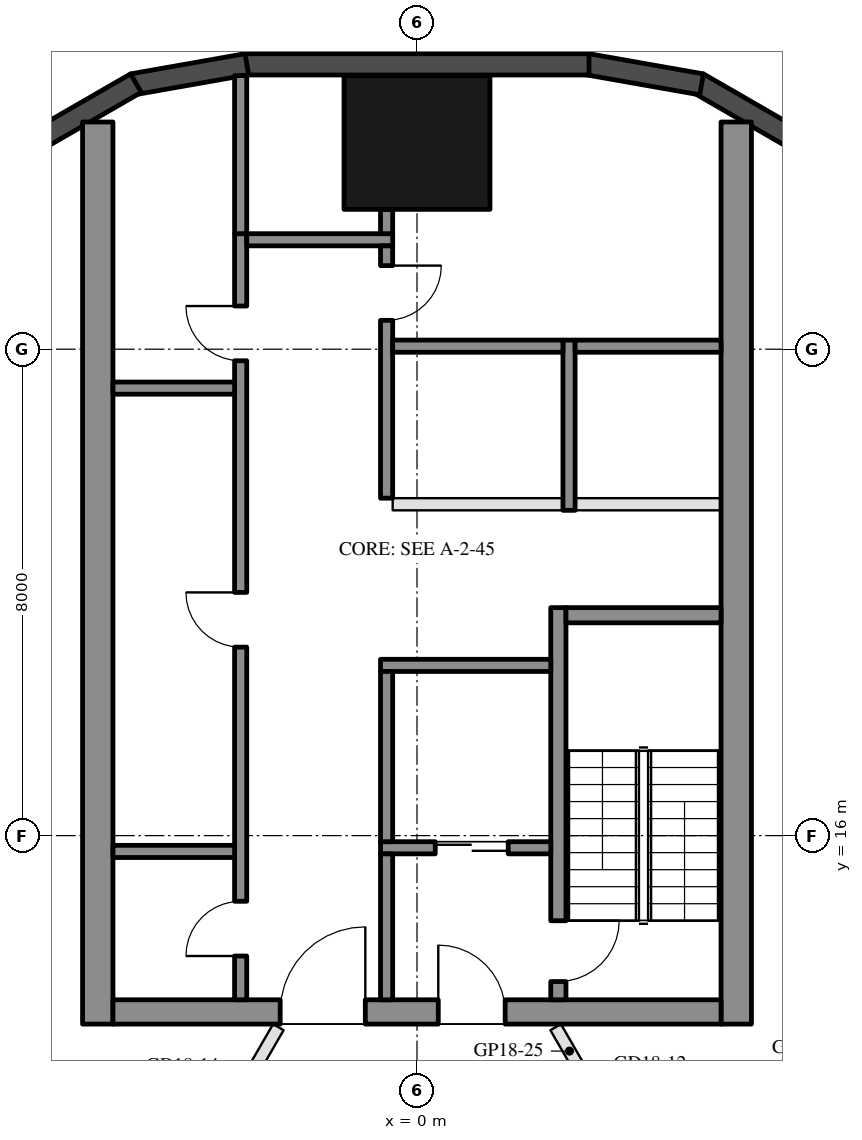
"""IFC4 building model, lengths in metres.
Left out: names, types, materials, properties, quantities, classifications, styles, units other than length and angle.
Written with IfcOpenShell. Run it as: python <this file> out.ifc"""

import sys

from ifc_helpers import new_model, si_unit, direction, frame, frame_2d, origin, origin_2d, place, context, subcontext, project, spatial, rectangle, hollow_rectangle, extrude, element, fill, save


model = new_model("IFC4")
c1 = context("Model", 3, precision=1e-05, world=origin(), true_north=direction((0.0, 1.0)))
c2 = subcontext(c1, "Body", "Model", "MODEL_VIEW")
j1 = project(units=[si_unit("LENGTHUNIT", "METRE"), si_unit("PLANEANGLEUNIT", "RADIAN")], contexts=[c1])
p1 = place(None, origin())
s1 = spatial("IfcSite", under=j1, at=p1, CompositionType="ELEMENT")
p2 = place(p1, origin())
s2 = spatial("IfcBuilding", under=s1, at=p2, CompositionType="ELEMENT")
p3 = place(p2, frame((0.0, 0.0, 191.0)))
s3 = spatial("IfcBuildingStorey", under=s2, at=p3, CompositionType="ELEMENT", Elevation=191.0)
p4 = place(p3, frame((0.0, 27.4, 0.0), z_axis=(0.0, 0.0, 1.0), x_axis=(1.0, 0.0, 0.0)))
e1 = element("IfcColumn", 1, at=p4, inside=s3, PredefinedType="COLUMN", context=c2, shape_type="SweptSolid", body=[
    extrude(hollow_rectangle(XDim=2.4, YDim=2.2, WallThickness=0.06, at=origin_2d()), origin(), (0.0, 0.0, 1.0), 3.7),
])
for number, where, z_axis, x_axis in (
    (2, (6.277, 27.422, 0.0), (0.0, 0.0, 1.0), (-0.866, 0.5, 0.0)),
    (3, (4.68, 28.356, 0.0), (0.0, 0.0, 1.0), (-0.985, 0.174, 0.0)),
):
    element("IfcWall", number, at=place(p3, frame(where, z_axis=z_axis, x_axis=x_axis)), inside=s3, PredefinedType="SOLIDWALL", context=c2, shape_type="SweptSolid", body=[
        extrude(rectangle(XDim=1.91, YDim=0.35, at=frame_2d((0.955, 0.0))), origin(), (0.0, 0.0, 1.0), 3.55),
    ])
p5 = place(p3, frame((2.829, 28.685, 0.0), z_axis=(0.0, 0.0, 1.0), x_axis=(-1.0, 0.0, 0.0)))
e4 = element("IfcWall", 4, at=p5, inside=s3, PredefinedType="SOLIDWALL", context=c2, shape_type="SweptSolid", body=[
    extrude(rectangle(XDim=5.658, YDim=0.35, at=frame_2d((2.829, 0.0))), origin(), (0.0, 0.0, 1.0), 3.55),
])
for number, where, z_axis, x_axis in (
    (5, (-2.799, 28.688, 0.0), (0.0, 0.0, 1.0), (-0.985, -0.174, 0.0)),
    (6, (-4.623, 28.377, 0.0), (0.0, 0.0, 1.0), (-0.866, -0.5, 0.0)),
):
    element("IfcWall", number, at=place(p3, frame(where, z_axis=z_axis, x_axis=x_axis)), inside=s3, PredefinedType="SOLIDWALL", context=c2, shape_type="SweptSolid", body=[
        extrude(rectangle(XDim=1.91, YDim=0.35, at=frame_2d((0.955, 0.0))), origin(), (0.0, 0.0, 1.0), 3.55),
    ])
for number, where, z_axis, x_axis in (
    (7, (5.25, 12.9, 0.0), (0.0, 0.0, 1.0), (0.0, 1.0, 0.0)),
    (8, (-5.25, 12.9, 0.0), (0.0, 0.0, 1.0), (0.0, 1.0, 0.0)),
):
    element("IfcWall", number, at=place(p3, frame(where, z_axis=z_axis, x_axis=x_axis)), inside=s3, PredefinedType="SHEAR", context=c2, shape_type="SweptSolid", body=[
        extrude(rectangle(XDim=14.837, YDim=0.5, at=frame_2d((7.418, 0.0))), origin(), (0.0, 0.0, 1.0), 3.5),
    ])
p6 = place(p3, frame((5.0, 13.1, 0.0), z_axis=(0.0, 0.0, 1.0), x_axis=(-1.0, 0.0, 0.0)))
e9 = element("IfcWall", 9, at=p6, inside=s3, PredefinedType="SHEAR", context=c2, shape_type="SweptSolid", body=[
    extrude(rectangle(XDim=10.0, YDim=0.4, at=frame_2d((5.0, 0.0))), origin(), (0.0, 0.0, 1.0), 3.5),
])
p7 = place(p6, frame((3.55, 0.0, 0.0)))
e10 = element("IfcOpeningElement", 10, at=p7, cuts=e9, PredefinedType="OPENING", context=c2, shape_type="SweptSolid", body=[
    extrude(rectangle(XDim=1.1, YDim=2.1, at=frame_2d((0.55, 1.05))), frame((0.0, 0.21, 0.0), z_axis=(0.0, -1.0, 0.0), x_axis=(1.0, 0.0, 0.0)), (0.0, 0.0, 1.0), 0.42),
])
p8 = place(p6, frame((5.85, 0.0, 0.0)))
e11 = element("IfcOpeningElement", 11, at=p8, cuts=e9, PredefinedType="OPENING", context=c2, shape_type="SweptSolid", body=[
    extrude(rectangle(XDim=1.4, YDim=2.1, at=frame_2d((0.7, 1.05))), frame((0.0, 0.21, 0.0), z_axis=(0.0, -1.0, 0.0), x_axis=(1.0, 0.0, 0.0)), (0.0, 0.0, 1.0), 0.42),
])
p9 = place(p3, frame((2.325, 13.3, 0.0), z_axis=(0.0, 0.0, 1.0), x_axis=(0.0, 1.0, 0.0)))
e12 = element("IfcWall", 12, at=p9, inside=s3, PredefinedType="SHEAR", context=c2, shape_type="SweptSolid", body=[
    extrude(rectangle(XDim=6.45, YDim=0.25, at=frame_2d((3.225, 0.0))), origin(), (0.0, 0.0, 1.0), 3.5),
])
p10 = place(p9, frame((0.3, 0.0, 0.0)))
e13 = element("IfcOpeningElement", 13, at=p10, cuts=e12, PredefinedType="OPENING", context=c2, shape_type="SweptSolid", body=[
    extrude(rectangle(XDim=1.0, YDim=2.1, at=frame_2d((0.5, 1.05))), frame((0.0, 0.135, 0.0), z_axis=(0.0, -1.0, 0.0), x_axis=(1.0, 0.0, 0.0)), (0.0, 0.0, 1.0), 0.27),
])
p11 = place(p3, frame((5.0, 19.625, 0.0), z_axis=(0.0, 0.0, 1.0), x_axis=(-1.0, 0.0, 0.0)))
e14 = element("IfcWall", 14, at=p11, inside=s3, PredefinedType="SHEAR", context=c2, shape_type="SweptSolid", body=[
    extrude(rectangle(XDim=2.55, YDim=0.25, at=frame_2d((1.275, 0.0))), origin(), (0.0, 0.0, 1.0), 3.5),
])
p12 = place(p3, frame((2.2, 18.8, 0.0), z_axis=(0.0, 0.0, 1.0), x_axis=(-1.0, 0.0, 0.0)))
e15 = element("IfcWall", 15, at=p12, inside=s3, PredefinedType="SHEAR", context=c2, shape_type="SweptSolid", body=[
    extrude(rectangle(XDim=2.8, YDim=0.2, at=frame_2d((1.4, 0.0))), origin(), (0.0, 0.0, 1.0), 3.5),
])
p13 = place(p3, frame((2.2, 15.8, 0.0), z_axis=(0.0, 0.0, 1.0), x_axis=(-1.0, 0.0, 0.0)))
e16 = element("IfcWall", 16, at=p13, inside=s3, PredefinedType="SHEAR", context=c2, shape_type="SweptSolid", body=[
    extrude(rectangle(XDim=2.8, YDim=0.2, at=frame_2d((1.4, 0.0))), origin(), (0.0, 0.0, 1.0), 3.5),
])
p14 = place(p13, frame((0.7, 0.0, 0.0)))
e17 = element("IfcOpeningElement", 17, at=p14, cuts=e16, PredefinedType="OPENING", context=c2, shape_type="SweptSolid", body=[
    extrude(rectangle(XDim=1.2, YDim=2.1, at=frame_2d((0.6, 1.05))), frame((0.0, 0.11, 0.0), z_axis=(0.0, -1.0, 0.0), x_axis=(1.0, 0.0, 0.0)), (0.0, 0.0, 1.0), 0.22),
])
p15 = place(p3, frame((-0.5, 15.9, 0.0), z_axis=(0.0, 0.0, 1.0), x_axis=(0.0, 1.0, 0.0)))
e18 = element("IfcWall", 18, at=p15, inside=s3, PredefinedType="SHEAR", context=c2, shape_type="SweptSolid", body=[
    extrude(rectangle(XDim=2.8, YDim=0.2, at=frame_2d((1.4, 0.0))), origin(), (0.0, 0.0, 1.0), 3.5),
])
p16 = place(p3, frame((-0.5, 13.3, 0.0), z_axis=(0.0, 0.0, 1.0), x_axis=(0.0, 1.0, 0.0)))
e19 = element("IfcWall", 19, at=p16, inside=s3, PredefinedType="SHEAR", context=c2, shape_type="SweptSolid", body=[
    extrude(rectangle(XDim=2.4, YDim=0.2, at=frame_2d((1.2, 0.0))), origin(), (0.0, 0.0, 1.0), 3.5),
])
p17 = place(p3, frame((-2.9, 13.3, 0.0), z_axis=(0.0, 0.0, 1.0), x_axis=(0.0, 1.0, 0.0)))
e20 = element("IfcWall", 20, at=p17, inside=s3, PredefinedType="SHEAR", context=c2, shape_type="SweptSolid", body=[
    extrude(rectangle(XDim=12.6, YDim=0.2, at=frame_2d((6.3, 0.0))), origin(), (0.0, 0.0, 1.0), 3.5),
])
p18 = place(p17, frame((0.72, 0.0, 0.0)))
e21 = element("IfcOpeningElement", 21, at=p18, cuts=e20, PredefinedType="OPENING", context=c2, shape_type="SweptSolid", body=[
    extrude(rectangle(XDim=0.9, YDim=2.1, at=frame_2d((0.45, 1.05))), frame((0.0, 0.11, 0.0), z_axis=(0.0, -1.0, 0.0), x_axis=(1.0, 0.0, 0.0)), (0.0, 0.0, 1.0), 0.22),
])
p19 = place(p17, frame((5.8, 0.0, 0.0)))
e22 = element("IfcOpeningElement", 22, at=p19, cuts=e20, PredefinedType="OPENING", context=c2, shape_type="SweptSolid", body=[
    extrude(rectangle(XDim=0.9, YDim=2.1, at=frame_2d((0.45, 1.05))), frame((0.0, 0.11, 0.0), z_axis=(0.0, -1.0, 0.0), x_axis=(1.0, 0.0, 0.0)), (0.0, 0.0, 1.0), 0.22),
])
p20 = place(p17, frame((10.51, 0.0, 0.0)))
e23 = element("IfcOpeningElement", 23, at=p20, cuts=e20, PredefinedType="OPENING", context=c2, shape_type="SweptSolid", body=[
    extrude(rectangle(XDim=0.9, YDim=2.1, at=frame_2d((0.45, 1.05))), frame((0.0, 0.11, 0.0), z_axis=(0.0, -1.0, 0.0), x_axis=(1.0, 0.0, 0.0)), (0.0, 0.0, 1.0), 0.22),
])
p21 = place(p3, frame((-0.4, 25.8, 0.0), z_axis=(0.0, 0.0, 1.0), x_axis=(-1.0, 0.0, 0.0)))
e24 = element("IfcWall", 24, at=p21, inside=s3, PredefinedType="SHEAR", context=c2, shape_type="SweptSolid", body=[
    extrude(rectangle(XDim=2.4, YDim=0.2, at=frame_2d((1.2, 0.0))), origin(), (0.0, 0.0, 1.0), 3.5),
])
p22 = place(p3, frame((-0.5, 21.55, 0.0), z_axis=(0.0, 0.0, 1.0), x_axis=(0.0, 1.0, 0.0)))
e25 = element("IfcWall", 25, at=p22, inside=s3, PredefinedType="SHEAR", context=c2, shape_type="SweptSolid", body=[
    extrude(rectangle(XDim=4.15, YDim=0.2, at=frame_2d((2.075, 0.0))), origin(), (0.0, 0.0, 1.0), 3.5),
])
p23 = place(p22, frame((2.925, 0.0, 0.0)))
e26 = element("IfcOpeningElement", 26, at=p23, cuts=e25, PredefinedType="OPENING", context=c2, shape_type="SweptSolid", body=[
    extrude(rectangle(XDim=0.9, YDim=2.1, at=frame_2d((0.45, 1.05))), frame((0.0, 0.11, 0.0), z_axis=(0.0, -1.0, 0.0), x_axis=(1.0, 0.0, 0.0)), (0.0, 0.0, 1.0), 0.22),
])
for number, where, z_axis, x_axis in (
    (27, (-3.0, 15.74, 0.0), (0.0, 0.0, 1.0), (-1.0, 0.0, 0.0)),
    (28, (-3.0, 23.36, 0.0), (0.0, 0.0, 1.0), (-1.0, 0.0, 0.0)),
):
    element("IfcWall", number, at=place(p3, frame(where, z_axis=z_axis, x_axis=x_axis)), inside=s3, PredefinedType="SHEAR", context=c2, shape_type="SweptSolid", body=[
        extrude(rectangle(XDim=2.0, YDim=0.2, at=frame_2d((1.0, 0.0))), origin(), (0.0, 0.0, 1.0), 3.5),
    ])
p24 = place(p3, frame((-0.5, 25.9, 0.0), z_axis=(0.0, 0.0, 1.0), x_axis=(0.0, 1.0, 0.0)))
e29 = element("IfcWall", 29, at=p24, inside=s3, PredefinedType="SHEAR", context=c2, shape_type="SweptSolid", body=[
    extrude(rectangle(XDim=0.4, YDim=0.2, at=frame_2d((0.2, 0.0))), origin(), (0.0, 0.0, 1.0), 3.5),
])
p25 = place(p3, frame((-2.9, 25.9, 0.0), z_axis=(0.0, 0.0, 1.0), x_axis=(0.0, 1.0, 0.0)))
e30 = element("IfcWall", 30, at=p25, inside=s3, PredefinedType="SHEAR", context=c2, shape_type="SweptSolid", body=[
    extrude(rectangle(XDim=2.6, YDim=0.2, at=frame_2d((1.3, 0.0))), origin(), (0.0, 0.0, 1.0), 3.5),
])
p26 = place(p3, frame((2.5, 21.35, 0.0), z_axis=(0.0, 0.0, 1.0), x_axis=(0.0, 1.0, 0.0)))
e31 = element("IfcWall", 31, at=p26, inside=s3, PredefinedType="SHEAR", context=c2, shape_type="SweptSolid", body=[
    extrude(rectangle(XDim=2.8, YDim=0.2, at=frame_2d((1.4, 0.0))), origin(), (0.0, 0.0, 1.0), 3.5),
])
p27 = place(p3, frame((5.0, 24.05, 0.0), z_axis=(0.0, 0.0, 1.0), x_axis=(-1.0, 0.0, 0.0)))
e32 = element("IfcWall", 32, at=p27, inside=s3, PredefinedType="SHEAR", context=c2, shape_type="SweptSolid", body=[
    extrude(rectangle(XDim=2.4, YDim=0.2, at=frame_2d((1.2, 0.0))), origin(), (0.0, 0.0, 1.0), 3.5),
])
p28 = place(p3, frame((2.4, 24.05, 0.0), z_axis=(0.0, 0.0, 1.0), x_axis=(-1.0, 0.0, 0.0)))
e33 = element("IfcWall", 33, at=p28, inside=s3, PredefinedType="SHEAR", context=c2, shape_type="SweptSolid", body=[
    extrude(rectangle(XDim=2.8, YDim=0.2, at=frame_2d((1.4, 0.0))), origin(), (0.0, 0.0, 1.0), 3.5),
])
p29 = place(p3, frame((5.0, 21.45, 0.0), z_axis=(0.0, 0.0, 1.0), x_axis=(-1.0, 0.0, 0.0)))
e34 = element("IfcWall", 34, at=p29, inside=s3, PredefinedType="PARTITIONING", context=c2, shape_type="SweptSolid", body=[
    extrude(rectangle(XDim=2.4, YDim=0.2, at=frame_2d((1.2, 0.0))), origin(), (0.0, 0.0, 1.0), 3.5),
])
p30 = place(p3, frame((2.4, 21.45, 0.0), z_axis=(0.0, 0.0, 1.0), x_axis=(-1.0, 0.0, 0.0)))
e35 = element("IfcWall", 35, at=p30, inside=s3, PredefinedType="PARTITIONING", context=c2, shape_type="SweptSolid", body=[
    extrude(rectangle(XDim=2.8, YDim=0.2, at=frame_2d((1.4, 0.0))), origin(), (0.0, 0.0, 1.0), 3.5),
])
p31 = place(p3, frame((13.647, 14.923, 0.0), z_axis=(0.0, 0.0, 1.0), x_axis=(-0.866027479907, -0.499996404033, 0.0)))
e36 = element("IfcWall", 36, at=p31, inside=s3, PredefinedType="PARTITIONING", context=c2, shape_type="SweptSolid", body=[
    extrude(rectangle(XDim=10.98, YDim=0.2, at=frame_2d((5.49, 0.0))), origin(), (0.0, 0.0, 1.0), 3.06),
])
p32 = place(p3, frame((-13.192, 13.91, 0.0), z_axis=(0.0, 0.0, 1.0), x_axis=(0.892469554868, -0.451107629766, 0.0)))
e37 = element("IfcWall", 37, at=p32, inside=s3, PredefinedType="PARTITIONING", context=c2, shape_type="SweptSolid", body=[
    extrude(rectangle(XDim=10.096, YDim=0.2, at=frame_2d((5.048, 0.0))), origin(), (0.0, 0.0, 1.0), 3.06),
])
p33 = place(p3, frame((2.281, 12.85, 0.0), z_axis=(0.0, 0.0, 1.0), x_axis=(0.499979074716, -0.866037484666, 0.0)))
e38 = element("IfcWall", 38, at=p33, inside=s3, PredefinedType="PARTITIONING", context=c2, shape_type="SweptSolid", body=[
    extrude(rectangle(XDim=3.788, YDim=0.2, at=frame_2d((1.894, 0.0))), origin(), (0.0, 0.0, 1.0), 2.95),
])
p34 = place(p33, frame((1.394, 0.0, 0.0)))
e39 = element("IfcOpeningElement", 39, at=p34, cuts=e38, PredefinedType="OPENING", context=c2, shape_type="SweptSolid", body=[
    extrude(rectangle(XDim=1.0, YDim=2.1, at=frame_2d((0.5, 1.05))), frame((0.0, 0.11, 0.0), z_axis=(0.0, -1.0, 0.0), x_axis=(1.0, 0.0, 0.0)), (0.0, 0.0, 1.0), 0.22),
])
p35 = place(p3, frame((-4.222, 9.488, 0.0), z_axis=(0.0, 0.0, 1.0), x_axis=(0.49998736472, 0.866032698644, 0.0)))
e40 = element("IfcWall", 40, at=p35, inside=s3, PredefinedType="PARTITIONING", context=c2, shape_type="SweptSolid", body=[
    extrude(rectangle(XDim=3.882, YDim=0.2, at=frame_2d((1.941, 0.0))), origin(), (0.0, 0.0, 1.0), 2.95),
])
p36 = place(p35, frame((1.441, 0.0, 0.0)))
e41 = element("IfcOpeningElement", 41, at=p36, cuts=e40, PredefinedType="OPENING", context=c2, shape_type="SweptSolid", body=[
    extrude(rectangle(XDim=1.0, YDim=2.1, at=frame_2d((0.5, 1.05))), frame((0.0, 0.11, 0.0), z_axis=(0.0, -1.0, 0.0), x_axis=(1.0, 0.0, 0.0)), (0.0, 0.0, 1.0), 0.22),
])
p37 = place(p14, origin())
e42 = element("IfcDoor", 42, at=p37, inside=s3, OperationType="DOUBLE_DOOR_SLIDING", PredefinedType="DOOR", context=c2, shape_type="SweptSolid", body=[
    extrude(rectangle(XDim=1.2, YDim=2.1, at=frame_2d((0.6, 1.05))), frame((0.0, 0.025, 0.0), z_axis=(0.0, -1.0, 0.0), x_axis=(1.0, 0.0, 0.0)), (0.0, 0.0, 1.0), 0.05),
])
fill(e17, e42)
p38 = place(p18, origin())
e43 = element("IfcDoor", 43, at=p38, inside=s3, OperationType="SINGLE_SWING_LEFT", PredefinedType="DOOR", context=c2, shape_type="SweptSolid", body=[
    extrude(rectangle(XDim=0.9, YDim=2.1, at=frame_2d((0.45, 1.05))), frame((0.0, 0.025, 0.0), z_axis=(0.0, -1.0, 0.0), x_axis=(1.0, 0.0, 0.0)), (0.0, 0.0, 1.0), 0.05),
])
fill(e21, e43)
p39 = place(p19, origin())
e44 = element("IfcDoor", 44, at=p39, inside=s3, OperationType="SINGLE_SWING_RIGHT", PredefinedType="DOOR", context=c2, shape_type="SweptSolid", body=[
    extrude(rectangle(XDim=0.9, YDim=2.1, at=frame_2d((0.45, 1.05))), frame((0.0, 0.025, 0.0), z_axis=(0.0, -1.0, 0.0), x_axis=(1.0, 0.0, 0.0)), (0.0, 0.0, 1.0), 0.05),
])
fill(e22, e44)
p40 = place(p20, origin())
e45 = element("IfcDoor", 45, at=p40, inside=s3, OperationType="SINGLE_SWING_RIGHT", PredefinedType="DOOR", context=c2, shape_type="SweptSolid", body=[
    extrude(rectangle(XDim=0.9, YDim=2.1, at=frame_2d((0.45, 1.05))), frame((0.0, 0.025, 0.0), z_axis=(0.0, -1.0, 0.0), x_axis=(1.0, 0.0, 0.0)), (0.0, 0.0, 1.0), 0.05),
])
fill(e23, e45)
p41 = place(p23, frame((0.9, 0.0, 0.0), z_axis=(0.0, 0.0, 1.0), x_axis=(-1.0, 0.0, 0.0)))
e46 = element("IfcDoor", 46, at=p41, inside=s3, OperationType="SINGLE_SWING_LEFT", PredefinedType="DOOR", context=c2, shape_type="SweptSolid", body=[
    extrude(rectangle(XDim=0.9, YDim=2.1, at=frame_2d((0.45, 1.05))), frame((0.0, 0.025, 0.0), z_axis=(0.0, -1.0, 0.0), x_axis=(1.0, 0.0, 0.0)), (0.0, 0.0, 1.0), 0.05),
])
fill(e26, e46)
p42 = place(p7, frame((1.1, 0.0, 0.0), z_axis=(0.0, 0.0, 1.0), x_axis=(-1.0, 0.0, 0.0)))
e47 = element("IfcDoor", 47, at=p42, inside=s3, OperationType="SINGLE_SWING_LEFT", PredefinedType="DOOR", context=c2, shape_type="SweptSolid", body=[
    extrude(rectangle(XDim=1.1, YDim=2.1, at=frame_2d((0.55, 1.05))), frame((0.0, 0.025, 0.0), z_axis=(0.0, -1.0, 0.0), x_axis=(1.0, 0.0, 0.0)), (0.0, 0.0, 1.0), 0.05),
])
fill(e10, e47)
p43 = place(p8, frame((1.4, 0.0, 0.0), z_axis=(0.0, 0.0, 1.0), x_axis=(-1.0, 0.0, 0.0)))
e48 = element("IfcDoor", 48, at=p43, inside=s3, OperationType="DOUBLE_DOOR_SINGLE_SWING", PredefinedType="DOOR", context=c2, shape_type="SweptSolid", body=[
    extrude(rectangle(XDim=1.4, YDim=2.1, at=frame_2d((0.7, 1.05))), frame((0.0, 0.025, 0.0), z_axis=(0.0, -1.0, 0.0), x_axis=(1.0, 0.0, 0.0)), (0.0, 0.0, 1.0), 0.05),
])
fill(e11, e48)
p44 = place(p10, frame((1.0, 0.0, 0.0), z_axis=(0.0, 0.0, 1.0), x_axis=(-1.0, 0.0, 0.0)))
e49 = element("IfcDoor", 49, at=p44, inside=s3, OperationType="SINGLE_SWING_LEFT", PredefinedType="DOOR", context=c2, shape_type="SweptSolid", body=[
    extrude(rectangle(XDim=1.0, YDim=2.1, at=frame_2d((0.5, 1.05))), frame((0.0, 0.025, 0.0), z_axis=(0.0, -1.0, 0.0), x_axis=(1.0, 0.0, 0.0)), (0.0, 0.0, 1.0), 0.05),
])
fill(e13, e49)
save(model, sys.argv[1])
